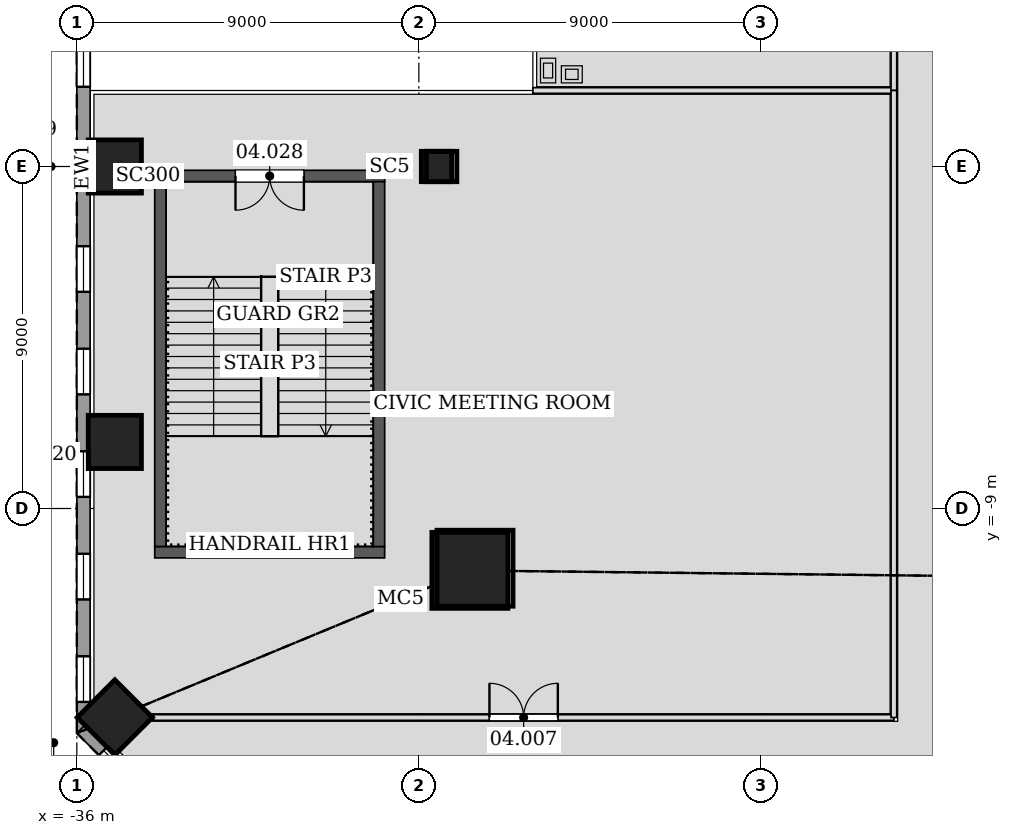
"""IFC4 building model, lengths in metres.
Left out: names, types, materials, properties, quantities, classifications, styles, units other than length and angle.
Written with IfcOpenShell. Run it as: python <this file> out.ifc"""

import sys

from ifc_helpers import new_model, si_unit, direction, frame, frame_2d, origin, origin_2d, place, context, subcontext, project, spatial, rectangle, hollow_rectangle, extrude, element, fill, save


model = new_model("IFC4")
c1 = context("Model", 3, precision=1e-05, world=origin(), true_north=direction((0.0, 1.0)))
c2 = subcontext(c1, "Body", "Model", "MODEL_VIEW")
j1 = project(units=[si_unit("LENGTHUNIT", "METRE"), si_unit("PLANEANGLEUNIT", "RADIAN")], contexts=[c1])
p1 = place(None, origin())
s1 = spatial("IfcSite", under=j1, at=p1, CompositionType="ELEMENT")
p2 = place(p1, origin())
s2 = spatial("IfcBuilding", under=s1, at=p2, CompositionType="ELEMENT")
p3 = place(p2, frame((0.0, 0.0, 24.0)))
s3 = spatial("IfcBuildingStorey", under=s2, at=p3, CompositionType="ELEMENT", Elevation=24.0)
p4 = place(p3, frame((-25.657, -10.628, 0.0), z_axis=(0.028266101221, 0.011692811656, 0.999532043347), x_axis=(-0.382253928177, 0.924057322028, 0.0)))
e1 = element("IfcColumn", 1, at=p4, inside=s3, PredefinedType="COLUMN", context=c2, shape_type="SweptSolid", body=[
    extrude(hollow_rectangle(XDim=2.0, YDim=2.0, WallThickness=0.09, at=origin_2d()), origin(), (0.0, 0.0, 1.0), 4.802),
])
p5 = place(p3, frame((-26.536, 0.0, 0.0), z_axis=(0.028318834767, 0.0, 0.999598941375), x_axis=(0.0, 1.0, 0.0)))
e2 = element("IfcColumn", 2, at=p5, inside=s3, PredefinedType="COLUMN", context=c2, shape_type="SweptSolid", body=[
    extrude(hollow_rectangle(XDim=0.8, YDim=0.8, WallThickness=0.05, at=origin_2d()), origin(), (0.0, 0.0, 1.0), 4.802),
])
for number, where, z_axis, x_axis in (
    (3, (-35.0, 0.0, 0.0), (0.0, 0.0, 1.0), (1.0, 0.0, 0.0)),
    (4, (-35.0, -7.249, 0.0), (0.0, 0.0, 1.0), (1.0, 0.0, 0.0)),
    (5, (-35.0, -14.498, 0.0), (0.0, 0.0, 1.0), (0.707, 0.707, 0.0)),
):
    element("IfcColumn", number, at=place(p3, frame(where, z_axis=z_axis, x_axis=x_axis)), inside=s3, PredefinedType="COLUMN", context=c2, shape_type="SweptSolid", body=[
        extrude(rectangle(XDim=1.4, YDim=1.4, at=origin_2d()), origin(), (0.0, 0.0, 1.0), 4.8),
    ])
p6 = place(p3, frame((-33.95, -10.15, 0.0), z_axis=(0.0, 0.0, 1.0), x_axis=(1.0, 0.0, 0.0)))
e6 = element("IfcWall", 6, at=p6, inside=s3, PredefinedType="SOLIDWALL", context=c2, shape_type="SweptSolid", body=[
    extrude(rectangle(XDim=6.05, YDim=0.3, at=frame_2d((3.025, 0.0))), origin(), (0.0, 0.0, 1.0), 4.8),
])
p7 = place(p3, frame((-27.9, -0.25, 0.0), z_axis=(0.0, 0.0, 1.0), x_axis=(-1.0, 0.0, 0.0)))
e7 = element("IfcWall", 7, at=p7, inside=s3, PredefinedType="SOLIDWALL", context=c2, shape_type="SweptSolid", body=[
    extrude(rectangle(XDim=6.05, YDim=0.3, at=frame_2d((3.025, 0.0))), origin(), (0.0, 0.0, 1.0), 4.8),
])
p8 = place(p7, frame((2.125, 0.0, 0.0)))
e8 = element("IfcOpeningElement", 8, at=p8, cuts=e7, PredefinedType="OPENING", context=c2, shape_type="SweptSolid", body=[
    extrude(rectangle(XDim=1.8, YDim=2.1, at=frame_2d((0.9, 1.05))), frame((0.0, 0.16, 0.0), z_axis=(0.0, -1.0, 0.0), x_axis=(1.0, 0.0, 0.0)), (0.0, 0.0, 1.0), 0.32),
])
p9 = place(p3, frame((-33.95, -0.25, 0.0), z_axis=(0.0, 0.0, 1.0), x_axis=(-1.0, 0.0, 0.0)))
e9 = element("IfcWall", 9, at=p9, inside=s3, PredefinedType="SOLIDWALL", context=c2, shape_type="SweptSolid", body=[
    extrude(rectangle(XDim=0.35, YDim=0.3, at=frame_2d((0.175, 0.0))), origin(), (0.0, 0.0, 1.0), 3.817),
])
for number, where, z_axis, x_axis in (
    (10, (-33.8, -0.4, 0.0), (0.0, 0.0, 1.0), (0.0, -1.0, 0.0)),
    (11, (-28.05, -10.0, 0.0), (0.0, 0.0, 1.0), (0.0, 1.0, 0.0)),
):
    element("IfcWall", number, at=place(p3, frame(where, z_axis=z_axis, x_axis=x_axis)), inside=s3, PredefinedType="SOLIDWALL", context=c2, shape_type="SweptSolid", body=[
        extrude(rectangle(XDim=9.6, YDim=0.3, at=frame_2d((4.8, 0.0))), origin(), (0.0, 0.0, 1.0), 4.8),
    ])
p10 = place(p3, frame((-35.825, 14.912, 0.0), z_axis=(0.0, 0.0, 1.0), x_axis=(0.0, -1.0, 0.0)))
e12 = element("IfcWall", 12, at=p10, inside=s3, PredefinedType="SOLIDWALL", context=c2, shape_type="SweptSolid", body=[
    extrude(rectangle(XDim=29.823, YDim=0.35, at=frame_2d((14.912, 0.0))), origin(), (0.0, 0.0, 1.0), 4.5),
])
p11 = place(p10, frame((0.822, 0.0, 0.9)))
e13 = element("IfcOpeningElement", 13, at=p11, cuts=e12, PredefinedType="OPENING", context=c2, shape_type="SweptSolid", body=[
    extrude(rectangle(XDim=1.2, YDim=3.0, at=frame_2d((0.6, 1.5))), frame((0.0, 0.185, 0.0), z_axis=(0.0, -1.0, 0.0), x_axis=(1.0, 0.0, 0.0)), (0.0, 0.0, 1.0), 0.37),
])
p12 = place(p10, frame((3.52, 0.0, 0.9)))
e14 = element("IfcOpeningElement", 14, at=p12, cuts=e12, PredefinedType="OPENING", context=c2, shape_type="SweptSolid", body=[
    extrude(rectangle(XDim=1.2, YDim=3.0, at=frame_2d((0.6, 1.5))), frame((0.0, 0.185, 0.0), z_axis=(0.0, -1.0, 0.0), x_axis=(1.0, 0.0, 0.0)), (0.0, 0.0, 1.0), 0.37),
])
p13 = place(p10, frame((6.218, 0.0, 0.9)))
e15 = element("IfcOpeningElement", 15, at=p13, cuts=e12, PredefinedType="OPENING", context=c2, shape_type="SweptSolid", body=[
    extrude(rectangle(XDim=1.2, YDim=3.0, at=frame_2d((0.6, 1.5))), frame((0.0, 0.185, 0.0), z_axis=(0.0, -1.0, 0.0), x_axis=(1.0, 0.0, 0.0)), (0.0, 0.0, 1.0), 0.37),
])
p14 = place(p10, frame((8.916, 0.0, 0.9)))
e16 = element("IfcOpeningElement", 16, at=p14, cuts=e12, PredefinedType="OPENING", context=c2, shape_type="SweptSolid", body=[
    extrude(rectangle(XDim=1.2, YDim=3.0, at=frame_2d((0.6, 1.5))), frame((0.0, 0.185, 0.0), z_axis=(0.0, -1.0, 0.0), x_axis=(1.0, 0.0, 0.0)), (0.0, 0.0, 1.0), 0.37),
])
p15 = place(p10, frame((11.614, 0.0, 0.9)))
e17 = element("IfcOpeningElement", 17, at=p15, cuts=e12, PredefinedType="OPENING", context=c2, shape_type="SweptSolid", body=[
    extrude(rectangle(XDim=1.2, YDim=3.0, at=frame_2d((0.6, 1.5))), frame((0.0, 0.185, 0.0), z_axis=(0.0, -1.0, 0.0), x_axis=(1.0, 0.0, 0.0)), (0.0, 0.0, 1.0), 0.37),
])
p16 = place(p10, frame((14.312, 0.0, 0.9)))
e18 = element("IfcOpeningElement", 18, at=p16, cuts=e12, PredefinedType="OPENING", context=c2, shape_type="SweptSolid", body=[
    extrude(rectangle(XDim=1.2, YDim=3.0, at=frame_2d((0.6, 1.5))), frame((0.0, 0.185, 0.0), z_axis=(0.0, -1.0, 0.0), x_axis=(1.0, 0.0, 0.0)), (0.0, 0.0, 1.0), 0.37),
])
p17 = place(p10, frame((17.01, 0.0, 0.9)))
e19 = element("IfcOpeningElement", 19, at=p17, cuts=e12, PredefinedType="OPENING", context=c2, shape_type="SweptSolid", body=[
    extrude(rectangle(XDim=1.2, YDim=3.0, at=frame_2d((0.6, 1.5))), frame((0.0, 0.185, 0.0), z_axis=(0.0, -1.0, 0.0), x_axis=(1.0, 0.0, 0.0)), (0.0, 0.0, 1.0), 0.37),
])
p18 = place(p10, frame((19.708, 0.0, 0.9)))
e20 = element("IfcOpeningElement", 20, at=p18, cuts=e12, PredefinedType="OPENING", context=c2, shape_type="SweptSolid", body=[
    extrude(rectangle(XDim=1.2, YDim=3.0, at=frame_2d((0.6, 1.5))), frame((0.0, 0.185, 0.0), z_axis=(0.0, -1.0, 0.0), x_axis=(1.0, 0.0, 0.0)), (0.0, 0.0, 1.0), 0.37),
])
p19 = place(p10, frame((22.406, 0.0, 0.9)))
e21 = element("IfcOpeningElement", 21, at=p19, cuts=e12, PredefinedType="OPENING", context=c2, shape_type="SweptSolid", body=[
    extrude(rectangle(XDim=1.2, YDim=3.0, at=frame_2d((0.6, 1.5))), frame((0.0, 0.185, 0.0), z_axis=(0.0, -1.0, 0.0), x_axis=(1.0, 0.0, 0.0)), (0.0, 0.0, 1.0), 0.37),
])
p20 = place(p10, frame((25.104, 0.0, 0.9)))
e22 = element("IfcOpeningElement", 22, at=p20, cuts=e12, PredefinedType="OPENING", context=c2, shape_type="SweptSolid", body=[
    extrude(rectangle(XDim=1.2, YDim=3.0, at=frame_2d((0.6, 1.5))), frame((0.0, 0.185, 0.0), z_axis=(0.0, -1.0, 0.0), x_axis=(1.0, 0.0, 0.0)), (0.0, 0.0, 1.0), 0.37),
])
p21 = place(p10, frame((27.802, 0.0, 0.9)))
e23 = element("IfcOpeningElement", 23, at=p21, cuts=e12, PredefinedType="OPENING", context=c2, shape_type="SweptSolid", body=[
    extrude(rectangle(XDim=1.2, YDim=3.0, at=frame_2d((0.6, 1.5))), frame((0.0, 0.185, 0.0), z_axis=(0.0, -1.0, 0.0), x_axis=(1.0, 0.0, 0.0)), (0.0, 0.0, 1.0), 0.37),
])
p22 = place(p3, frame((-35.876, -14.788, 0.0), z_axis=(0.0, 0.0, 1.0), x_axis=(0.707106781187, -0.707106781187, 0.0)))
e24 = element("IfcWall", 24, at=p22, inside=s3, PredefinedType="SOLIDWALL", context=c2, shape_type="SweptSolid", body=[
    extrude(rectangle(XDim=29.823, YDim=0.35, at=frame_2d((14.912, 0.0))), origin(), (0.0, 0.0, 1.0), 4.5),
])
p23 = place(p22, frame((0.822, 0.0, 0.9)))
e25 = element("IfcOpeningElement", 25, at=p23, cuts=e24, PredefinedType="OPENING", context=c2, shape_type="SweptSolid", body=[
    extrude(rectangle(XDim=1.2, YDim=3.0, at=frame_2d((0.6, 1.5))), frame((0.0, 0.185, 0.0), z_axis=(0.0, -1.0, 0.0), x_axis=(1.0, 0.0, 0.0)), (0.0, 0.0, 1.0), 0.37),
])
p24 = place(p22, frame((3.52, 0.0, 0.9)))
e26 = element("IfcOpeningElement", 26, at=p24, cuts=e24, PredefinedType="OPENING", context=c2, shape_type="SweptSolid", body=[
    extrude(rectangle(XDim=1.2, YDim=3.0, at=frame_2d((0.6, 1.5))), frame((0.0, 0.185, 0.0), z_axis=(0.0, -1.0, 0.0), x_axis=(1.0, 0.0, 0.0)), (0.0, 0.0, 1.0), 0.37),
])
p25 = place(p22, frame((6.218, 0.0, 0.9)))
e27 = element("IfcOpeningElement", 27, at=p25, cuts=e24, PredefinedType="OPENING", context=c2, shape_type="SweptSolid", body=[
    extrude(rectangle(XDim=1.2, YDim=3.0, at=frame_2d((0.6, 1.5))), frame((0.0, 0.185, 0.0), z_axis=(0.0, -1.0, 0.0), x_axis=(1.0, 0.0, 0.0)), (0.0, 0.0, 1.0), 0.37),
])
p26 = place(p22, frame((8.916, 0.0, 0.9)))
e28 = element("IfcOpeningElement", 28, at=p26, cuts=e24, PredefinedType="OPENING", context=c2, shape_type="SweptSolid", body=[
    extrude(rectangle(XDim=1.2, YDim=3.0, at=frame_2d((0.6, 1.5))), frame((0.0, 0.185, 0.0), z_axis=(0.0, -1.0, 0.0), x_axis=(1.0, 0.0, 0.0)), (0.0, 0.0, 1.0), 0.37),
])
p27 = place(p22, frame((11.614, 0.0, 0.9)))
e29 = element("IfcOpeningElement", 29, at=p27, cuts=e24, PredefinedType="OPENING", context=c2, shape_type="SweptSolid", body=[
    extrude(rectangle(XDim=1.2, YDim=3.0, at=frame_2d((0.6, 1.5))), frame((0.0, 0.185, 0.0), z_axis=(0.0, -1.0, 0.0), x_axis=(1.0, 0.0, 0.0)), (0.0, 0.0, 1.0), 0.37),
])
p28 = place(p22, frame((14.312, 0.0, 0.9)))
e30 = element("IfcOpeningElement", 30, at=p28, cuts=e24, PredefinedType="OPENING", context=c2, shape_type="SweptSolid", body=[
    extrude(rectangle(XDim=1.2, YDim=3.0, at=frame_2d((0.6, 1.5))), frame((0.0, 0.185, 0.0), z_axis=(0.0, -1.0, 0.0), x_axis=(1.0, 0.0, 0.0)), (0.0, 0.0, 1.0), 0.37),
])
p29 = place(p22, frame((17.01, 0.0, 0.9)))
e31 = element("IfcOpeningElement", 31, at=p29, cuts=e24, PredefinedType="OPENING", context=c2, shape_type="SweptSolid", body=[
    extrude(rectangle(XDim=1.2, YDim=3.0, at=frame_2d((0.6, 1.5))), frame((0.0, 0.185, 0.0), z_axis=(0.0, -1.0, 0.0), x_axis=(1.0, 0.0, 0.0)), (0.0, 0.0, 1.0), 0.37),
])
p30 = place(p22, frame((19.708, 0.0, 0.9)))
e32 = element("IfcOpeningElement", 32, at=p30, cuts=e24, PredefinedType="OPENING", context=c2, shape_type="SweptSolid", body=[
    extrude(rectangle(XDim=1.2, YDim=3.0, at=frame_2d((0.6, 1.5))), frame((0.0, 0.185, 0.0), z_axis=(0.0, -1.0, 0.0), x_axis=(1.0, 0.0, 0.0)), (0.0, 0.0, 1.0), 0.37),
])
p31 = place(p22, frame((22.406, 0.0, 0.9)))
e33 = element("IfcOpeningElement", 33, at=p31, cuts=e24, PredefinedType="OPENING", context=c2, shape_type="SweptSolid", body=[
    extrude(rectangle(XDim=1.2, YDim=3.0, at=frame_2d((0.6, 1.5))), frame((0.0, 0.185, 0.0), z_axis=(0.0, -1.0, 0.0), x_axis=(1.0, 0.0, 0.0)), (0.0, 0.0, 1.0), 0.37),
])
p32 = place(p22, frame((25.104, 0.0, 0.9)))
e34 = element("IfcOpeningElement", 34, at=p32, cuts=e24, PredefinedType="OPENING", context=c2, shape_type="SweptSolid", body=[
    extrude(rectangle(XDim=1.2, YDim=3.0, at=frame_2d((0.6, 1.5))), frame((0.0, 0.185, 0.0), z_axis=(0.0, -1.0, 0.0), x_axis=(1.0, 0.0, 0.0)), (0.0, 0.0, 1.0), 0.37),
])
p33 = place(p22, frame((27.802, 0.0, 0.9)))
e35 = element("IfcOpeningElement", 35, at=p33, cuts=e24, PredefinedType="OPENING", context=c2, shape_type="SweptSolid", body=[
    extrude(rectangle(XDim=1.2, YDim=3.0, at=frame_2d((0.6, 1.5))), frame((0.0, 0.185, 0.0), z_axis=(0.0, -1.0, 0.0), x_axis=(1.0, 0.0, 0.0)), (0.0, 0.0, 1.0), 0.37),
])
p34 = place(p3, frame((-24.0, 2.0, 0.0), z_axis=(0.0, 0.0, 1.0), x_axis=(1.0, 0.0, 0.0)))
e36 = element("IfcWall", 36, at=p34, inside=s3, PredefinedType="PARTITIONING", context=c2, shape_type="SweptSolid", body=[
    extrude(rectangle(XDim=9.5, YDim=0.15, at=frame_2d((4.75, 0.0))), origin(), (0.0, 0.0, 1.0), 3.507),
])
p35 = place(p3, frame((-14.5, 2.0, 0.0), z_axis=(0.0, 0.0, 1.0), x_axis=(0.0, 1.0, 0.0)))
e37 = element("IfcWall", 37, at=p35, inside=s3, PredefinedType="PARTITIONING", context=c2, shape_type="SweptSolid", body=[
    extrude(rectangle(XDim=4.25, YDim=0.15, at=frame_2d((2.125, 0.0))), origin(), (0.0, 0.0, 1.0), 4.5),
])
p36 = place(p35, frame((1.675, 0.0, 0.0)))
e38 = element("IfcOpeningElement", 38, at=p36, cuts=e37, PredefinedType="OPENING", context=c2, shape_type="SweptSolid", body=[
    extrude(rectangle(XDim=0.9, YDim=2.1, at=frame_2d((0.45, 1.05))), frame((0.0, 0.085, 0.0), z_axis=(0.0, -1.0, 0.0), x_axis=(1.0, 0.0, 0.0)), (0.0, 0.0, 1.0), 0.17),
])
p37 = place(p3, frame((-33.986, -14.5, 0.0), z_axis=(0.0, 0.0, 1.0), x_axis=(1.0, 0.0, 0.0)))
e39 = element("IfcWall", 39, at=p37, inside=s3, PredefinedType="PARTITIONING", context=c2, shape_type="SweptSolid", body=[
    extrude(rectangle(XDim=19.486, YDim=0.15, at=frame_2d((9.743, 0.0))), origin(), (0.0, 0.0, 1.0), 3.448),
])
p38 = place(p37, frame((8.843, 0.0, 0.0)))
e40 = element("IfcOpeningElement", 40, at=p38, cuts=e39, PredefinedType="OPENING", context=c2, shape_type="SweptSolid", body=[
    extrude(rectangle(XDim=1.8, YDim=2.4, at=frame_2d((0.9, 1.2))), frame((0.0, 0.085, 0.0), z_axis=(0.0, -1.0, 0.0), x_axis=(1.0, 0.0, 0.0)), (0.0, 0.0, 1.0), 0.17),
])
p39 = place(p3, frame((-14.5, -14.5, 0.0), z_axis=(0.0, 0.0, 1.0), x_axis=(0.0, 1.0, 0.0)))
e41 = element("IfcWall", 41, at=p39, inside=s3, PredefinedType="PARTITIONING", context=c2, shape_type="SweptSolid", body=[
    extrude(rectangle(XDim=16.5, YDim=0.15, at=frame_2d((8.25, 0.0))), origin(), (0.0, 0.0, 1.0), 3.19),
])
p40 = place(p15, origin())
e42 = element("IfcWindow", 42, at=p40, inside=s3, PartitioningType="SINGLE_PANEL", PredefinedType="WINDOW", context=c2, shape_type="SweptSolid", body=[
    extrude(rectangle(XDim=1.2, YDim=3.0, at=frame_2d((0.6, 1.5))), frame((0.0, 0.03, 0.0), z_axis=(0.0, -1.0, 0.0), x_axis=(1.0, 0.0, 0.0)), (0.0, 0.0, 1.0), 0.06),
])
fill(e17, e42)
p41 = place(p16, origin())
e43 = element("IfcWindow", 43, at=p41, inside=s3, PartitioningType="SINGLE_PANEL", PredefinedType="WINDOW", context=c2, shape_type="SweptSolid", body=[
    extrude(rectangle(XDim=1.2, YDim=3.0, at=frame_2d((0.6, 1.5))), frame((0.0, 0.03, 0.0), z_axis=(0.0, -1.0, 0.0), x_axis=(1.0, 0.0, 0.0)), (0.0, 0.0, 1.0), 0.06),
])
fill(e18, e43)
p42 = place(p17, origin())
e44 = element("IfcWindow", 44, at=p42, inside=s3, PartitioningType="SINGLE_PANEL", PredefinedType="WINDOW", context=c2, shape_type="SweptSolid", body=[
    extrude(rectangle(XDim=1.2, YDim=3.0, at=frame_2d((0.6, 1.5))), frame((0.0, 0.03, 0.0), z_axis=(0.0, -1.0, 0.0), x_axis=(1.0, 0.0, 0.0)), (0.0, 0.0, 1.0), 0.06),
])
fill(e19, e44)
p43 = place(p18, origin())
e45 = element("IfcWindow", 45, at=p43, inside=s3, PartitioningType="SINGLE_PANEL", PredefinedType="WINDOW", context=c2, shape_type="SweptSolid", body=[
    extrude(rectangle(XDim=1.2, YDim=3.0, at=frame_2d((0.6, 1.5))), frame((0.0, 0.03, 0.0), z_axis=(0.0, -1.0, 0.0), x_axis=(1.0, 0.0, 0.0)), (0.0, 0.0, 1.0), 0.06),
])
fill(e20, e45)
p44 = place(p19, origin())
e46 = element("IfcWindow", 46, at=p44, inside=s3, PartitioningType="SINGLE_PANEL", PredefinedType="WINDOW", context=c2, shape_type="SweptSolid", body=[
    extrude(rectangle(XDim=1.2, YDim=3.0, at=frame_2d((0.6, 1.5))), frame((0.0, 0.03, 0.0), z_axis=(0.0, -1.0, 0.0), x_axis=(1.0, 0.0, 0.0)), (0.0, 0.0, 1.0), 0.06),
])
fill(e21, e46)
p45 = place(p20, origin())
e47 = element("IfcWindow", 47, at=p45, inside=s3, PartitioningType="SINGLE_PANEL", PredefinedType="WINDOW", context=c2, shape_type="SweptSolid", body=[
    extrude(rectangle(XDim=1.2, YDim=3.0, at=frame_2d((0.6, 1.5))), frame((0.0, 0.03, 0.0), z_axis=(0.0, -1.0, 0.0), x_axis=(1.0, 0.0, 0.0)), (0.0, 0.0, 1.0), 0.06),
])
fill(e22, e47)
p46 = place(p21, origin())
e48 = element("IfcWindow", 48, at=p46, inside=s3, PartitioningType="SINGLE_PANEL", PredefinedType="WINDOW", context=c2, shape_type="SweptSolid", body=[
    extrude(rectangle(XDim=1.2, YDim=3.0, at=frame_2d((0.6, 1.5))), frame((0.0, 0.03, 0.0), z_axis=(0.0, -1.0, 0.0), x_axis=(1.0, 0.0, 0.0)), (0.0, 0.0, 1.0), 0.06),
])
fill(e23, e48)
p47 = place(p23, origin())
e49 = element("IfcWindow", 49, at=p47, inside=s3, PartitioningType="SINGLE_PANEL", PredefinedType="WINDOW", context=c2, shape_type="SweptSolid", body=[
    extrude(rectangle(XDim=1.2, YDim=3.0, at=frame_2d((0.6, 1.5))), frame((0.0, 0.03, 0.0), z_axis=(0.0, -1.0, 0.0), x_axis=(1.0, 0.0, 0.0)), (0.0, 0.0, 1.0), 0.06),
])
fill(e25, e49)
p48 = place(p38, origin())
e50 = element("IfcDoor", 50, at=p48, inside=s3, OperationType="DOUBLE_DOOR_SINGLE_SWING", PredefinedType="DOOR", context=c2, shape_type="SweptSolid", body=[
    extrude(rectangle(XDim=1.8, YDim=2.4, at=frame_2d((0.9, 1.2))), frame((0.0, 0.025, 0.0), z_axis=(0.0, -1.0, 0.0), x_axis=(1.0, 0.0, 0.0)), (0.0, 0.0, 1.0), 0.05),
])
fill(e40, e50)
p49 = place(p8, origin())
e51 = element("IfcDoor", 51, at=p49, inside=s3, OperationType="DOUBLE_DOOR_SINGLE_SWING", PredefinedType="DOOR", context=c2, shape_type="SweptSolid", body=[
    extrude(rectangle(XDim=1.8, YDim=2.1, at=frame_2d((0.9, 1.05))), frame((0.0, 0.025, 0.0), z_axis=(0.0, -1.0, 0.0), x_axis=(1.0, 0.0, 0.0)), (0.0, 0.0, 1.0), 0.05),
])
fill(e8, e51)
save(model, sys.argv[1])
